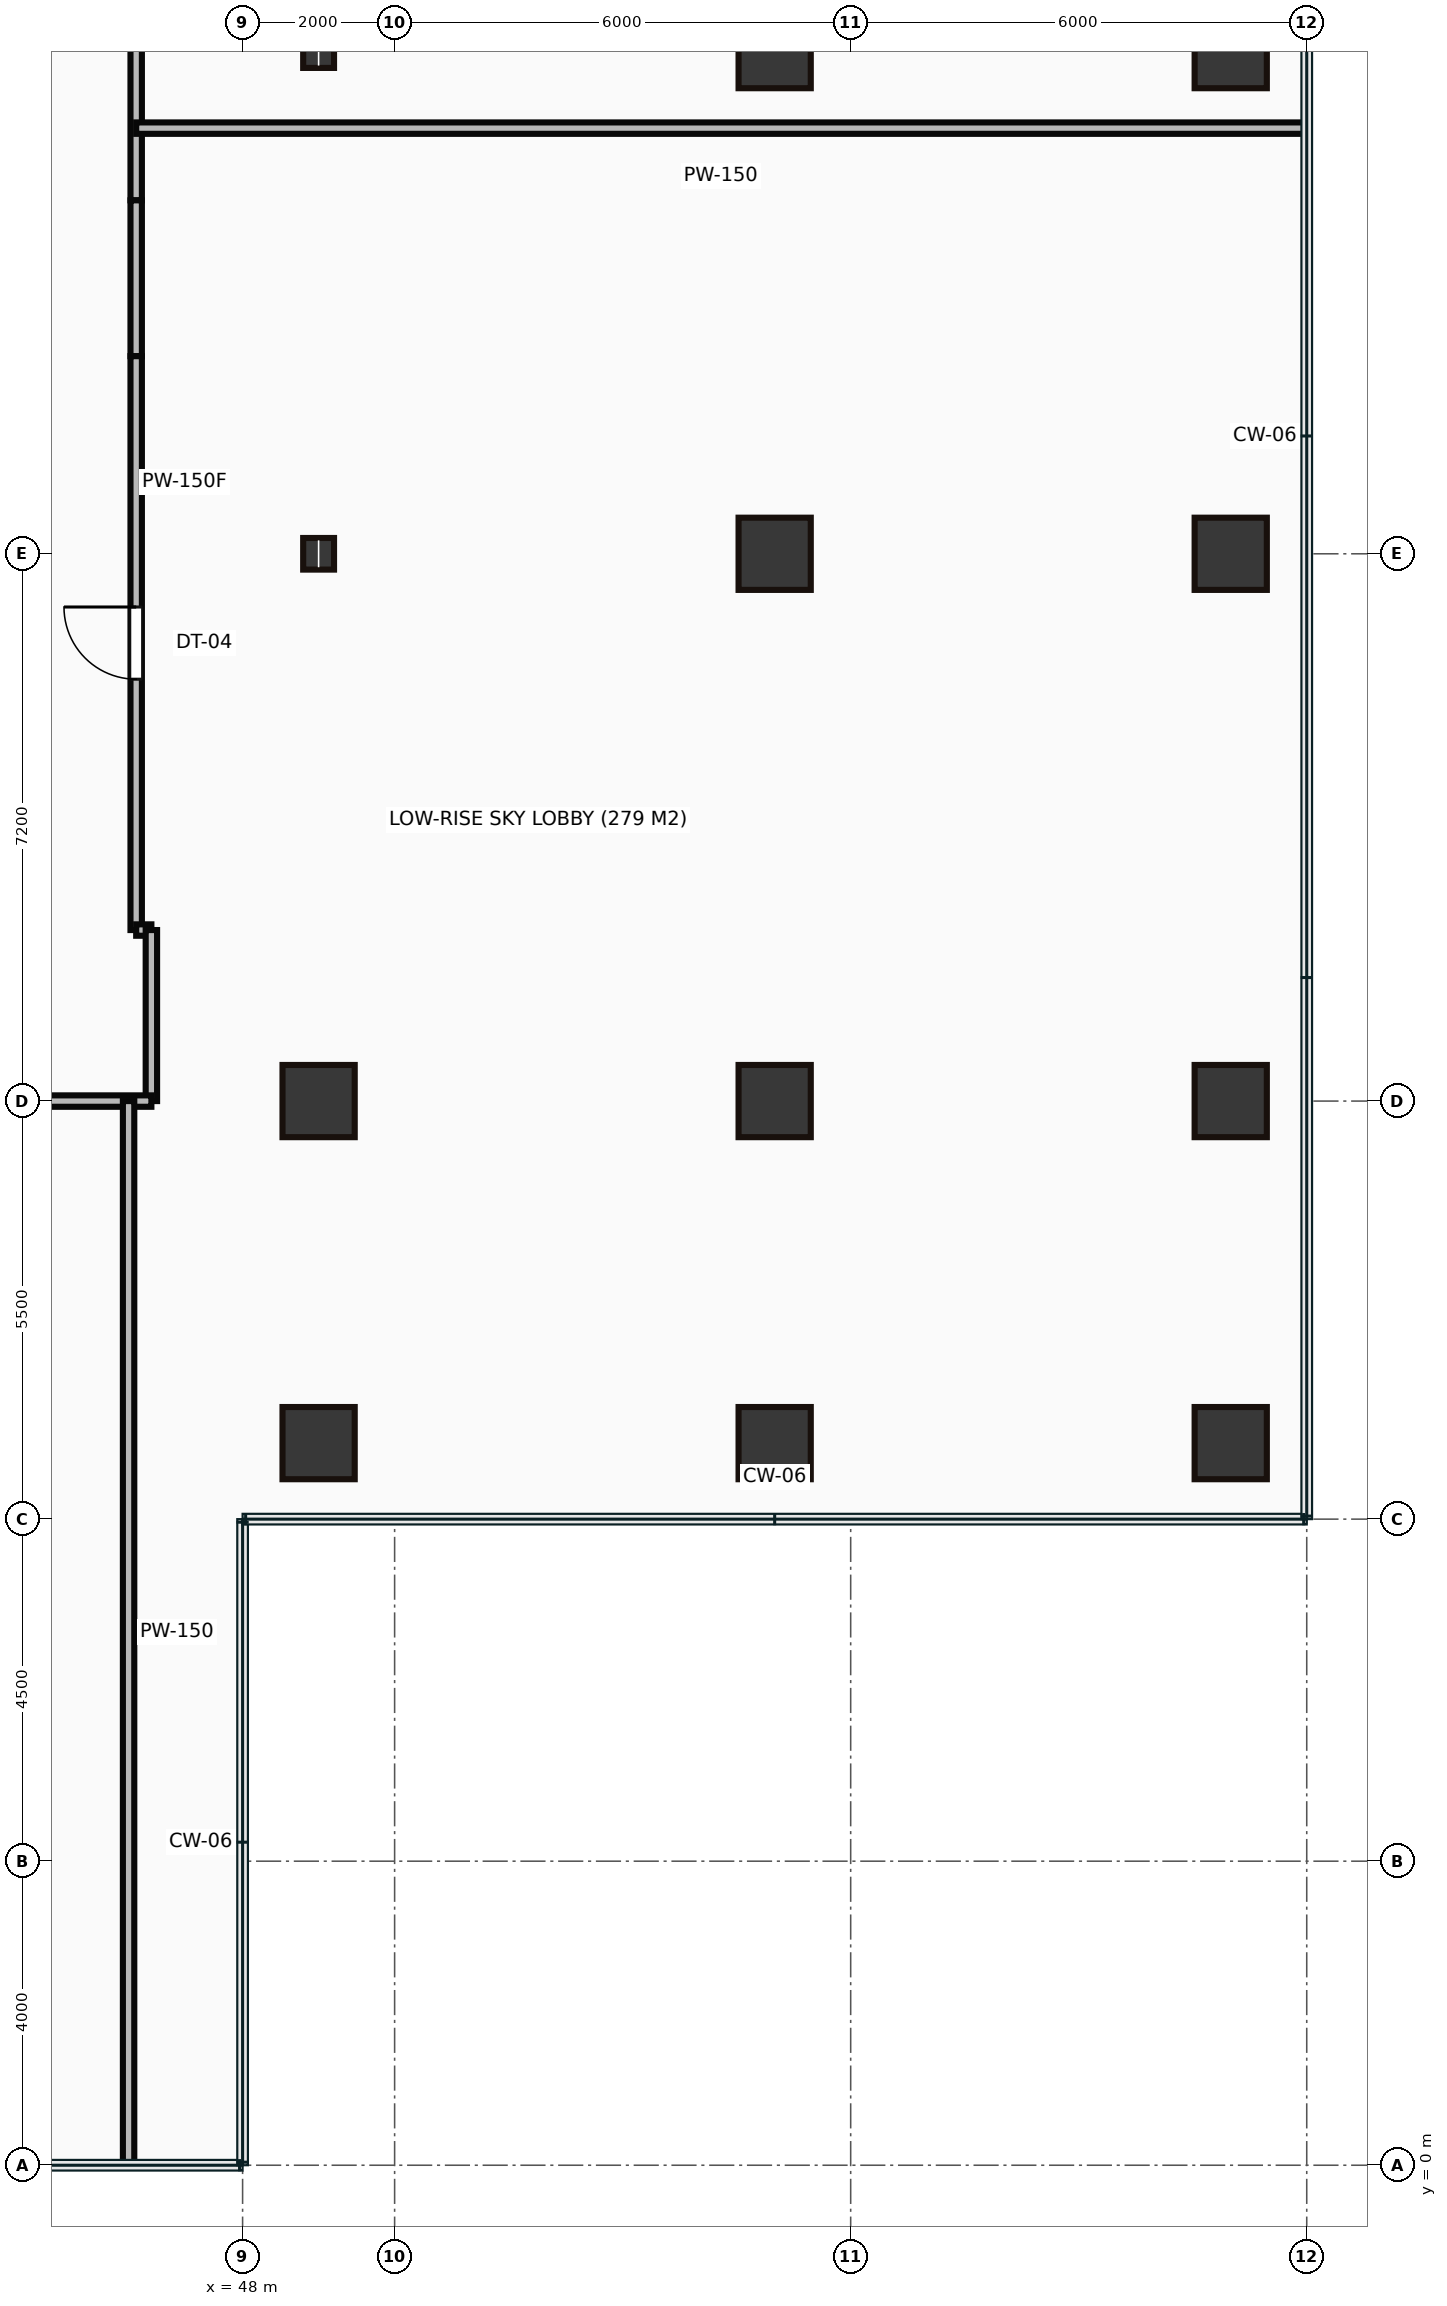
"""IFC4 building model, lengths in metres.
Left out: names, types, materials, properties, quantities, classifications, styles, units other than length and angle.
Written with IfcOpenShell. Run it as: python <this file> out.ifc"""

import sys

from ifc_helpers import new_model, si_unit, direction, frame, frame_2d, origin, origin_2d, place, context, subcontext, project, spatial, rectangle, hollow_rectangle, i_section, extrude, source, transform, mapped, element, fill, save


model = new_model("IFC4")
c1 = context("Model", 3, precision=1e-05, world=origin(), true_north=direction((0.0, 1.0)))
c2 = subcontext(c1, "Body", "Model", "MODEL_VIEW")
j1 = project(units=[si_unit("LENGTHUNIT", "METRE"), si_unit("PLANEANGLEUNIT", "RADIAN")], contexts=[c1])
p1 = place(None, origin())
s1 = spatial("IfcSite", under=j1, at=p1, CompositionType="ELEMENT")
p2 = place(p1, origin())
s2 = spatial("IfcBuilding", under=s1, at=p2, CompositionType="ELEMENT")
p3 = place(p2, frame((0.0, 0.0, 79.95)))
s3 = spatial("IfcBuildingStorey", under=s2, at=p3, CompositionType="ELEMENT", Elevation=79.95)
m1 = source(origin(), c2, "Body", "SweptSolid", [
    extrude(hollow_rectangle(XDim=0.95, YDim=0.95, WallThickness=0.045, at=origin_2d()), origin(), (0.0, 0.0, 1.0), 4.2),
])
for number, where, z_axis, x_axis in (
    (1, (49.0, 9.5, 0.0), (0.0, 0.0, 1.0), (1.0, 0.0, 0.0)),
    (2, (49.0, 14.0, 0.0), (0.0, 0.0, 1.0), (1.0, 0.0, 0.0)),
):
    element("IfcColumn", number, at=place(p3, frame(where, z_axis=z_axis, x_axis=x_axis)), inside=s3, PredefinedType="COLUMN", context=c2, shape_type="MappedRepresentation", body=[
        mapped(m1, transform((0.0, 0.0, 0.0))),
    ])
m2 = source(origin(), c2, "Body", "SweptSolid", [
    extrude(i_section(OverallWidth=0.406, OverallDepth=0.416, WebThickness=0.03, FlangeThickness=0.048, at=origin_2d()), origin(), (0.0, 0.0, 1.0), 4.2),
])
for number, where, z_axis, x_axis in (
    (3, (49.0, 21.2, 0.0), (0.0, 0.0, 1.0), (1.0, 0.0, 0.0)),
    (4, (49.0, 27.8, 0.0), (0.0, 0.0, 1.0), (1.0, 0.0, 0.0)),
):
    element("IfcColumn", number, at=place(p3, frame(where, z_axis=z_axis, x_axis=x_axis)), inside=s3, PredefinedType="COLUMN", context=c2, shape_type="MappedRepresentation", body=[
        mapped(m2, transform((0.0, 0.0, 0.0))),
    ])
for number, where, z_axis, x_axis in (
    (5, (55.0, 9.5, 0.0), (0.0, 0.0, 1.0), (1.0, 0.0, 0.0)),
    (6, (55.0, 14.0, 0.0), (0.0, 0.0, 1.0), (1.0, 0.0, 0.0)),
    (7, (55.0, 21.2, 0.0), (0.0, 0.0, 1.0), (1.0, 0.0, 0.0)),
    (8, (55.0, 27.8, 0.0), (0.0, 0.0, 1.0), (1.0, 0.0, 0.0)),
    (9, (61.0, 9.5, 0.0), (0.0, 0.0, 1.0), (1.0, 0.0, 0.0)),
    (10, (61.0, 14.0, 0.0), (0.0, 0.0, 1.0), (1.0, 0.0, 0.0)),
    (11, (61.0, 21.2, 0.0), (0.0, 0.0, 1.0), (1.0, 0.0, 0.0)),
    (12, (61.0, 27.8, 0.0), (0.0, 0.0, 1.0), (1.0, 0.0, 0.0)),
):
    element("IfcColumn", number, at=place(p3, frame(where, z_axis=z_axis, x_axis=x_axis)), inside=s3, PredefinedType="COLUMN", context=c2, shape_type="MappedRepresentation", body=[
        mapped(m1, transform((0.0, 0.0, 0.0))),
    ])
m3 = source(origin(), c2, "Body", "SweptSolid", [
    extrude(rectangle(XDim=9.15, YDim=0.15, at=frame_2d((4.575, 0.0))), origin(), (0.0, 0.0, 1.0), 3.9),
])
p4 = place(p3, frame((46.6, 35.0, 0.0), z_axis=(0.0, 0.0, 1.0), x_axis=(0.0, -1.0, 0.0)))
e13 = element("IfcWall", 13, at=p4, inside=s3, PredefinedType="PARTITIONING", context=c2, shape_type="MappedRepresentation", body=[
    mapped(m3, transform((0.0, 0.0, 0.0))),
])
p5 = place(p4, frame((3.755, 0.0, 0.0)))
e14 = element("IfcOpeningElement", 14, at=p5, cuts=e13, PredefinedType="OPENING", context=c2, shape_type="SweptSolid", body=[
    extrude(rectangle(XDim=0.95, YDim=2.15, at=frame_2d((0.475, 1.075))), frame((0.0, 0.085, 0.0), z_axis=(0.0, -1.0, 0.0), x_axis=(1.0, 0.0, 0.0)), (0.0, 0.0, 1.0), 0.17),
])
m4 = source(origin(), c2, "Body", "SweptSolid", [
    extrude(rectangle(XDim=2.05, YDim=0.15, at=frame_2d((1.025, 0.0))), origin(), (0.0, 0.0, 1.0), 3.9),
])
p6 = place(p3, frame((46.6, 25.85, 0.0), z_axis=(0.0, 0.0, 1.0), x_axis=(0.0, -1.0, 0.0)))
e15 = element("IfcWall", 15, at=p6, inside=s3, PredefinedType="PARTITIONING", context=c2, shape_type="MappedRepresentation", body=[
    mapped(m4, transform((0.0, 0.0, 0.0))),
])
m5 = source(origin(), c2, "Body", "SweptSolid", [
    extrude(rectangle(XDim=7.55, YDim=0.15, at=frame_2d((3.775, 0.0))), origin(), (0.0, 0.0, 1.0), 3.9),
])
p7 = place(p3, frame((46.6, 23.8, 0.0), z_axis=(0.0, 0.0, 1.0), x_axis=(0.0, -1.0, 0.0)))
e16 = element("IfcWall", 16, at=p7, inside=s3, PredefinedType="PARTITIONING", context=c2, shape_type="MappedRepresentation", body=[
    mapped(m5, transform((0.0, 0.0, 0.0))),
])
p8 = place(p7, frame((3.3, 0.0, 0.0)))
e17 = element("IfcOpeningElement", 17, at=p8, cuts=e16, PredefinedType="OPENING", context=c2, shape_type="SweptSolid", body=[
    extrude(rectangle(XDim=0.95, YDim=2.15, at=frame_2d((0.475, 1.075))), frame((0.0, 0.085, 0.0), z_axis=(0.0, -1.0, 0.0), x_axis=(1.0, 0.0, 0.0)), (0.0, 0.0, 1.0), 0.17),
])
m6 = source(origin(), c2, "Body", "SweptSolid", [
    extrude(rectangle(XDim=0.2, YDim=0.15, at=frame_2d((0.1, 0.0))), origin(), (0.0, 0.0, 1.0), 3.9),
])
p9 = place(p3, frame((46.6, 16.25, 0.0), z_axis=(0.0, 0.0, 1.0), x_axis=(1.0, 0.0, 0.0)))
e18 = element("IfcWall", 18, at=p9, inside=s3, PredefinedType="PARTITIONING", context=c2, shape_type="MappedRepresentation", body=[
    mapped(m6, transform((0.0, 0.0, 0.0))),
])
m7 = source(origin(), c2, "Body", "SweptSolid", [
    extrude(rectangle(XDim=2.25, YDim=0.15, at=frame_2d((1.125, 0.0))), origin(), (0.0, 0.0, 1.0), 3.9),
])
p10 = place(p3, frame((46.8, 16.25, 0.0), z_axis=(0.0, 0.0, 1.0), x_axis=(0.0, -1.0, 0.0)))
e19 = element("IfcWall", 19, at=p10, inside=s3, PredefinedType="PARTITIONING", context=c2, shape_type="MappedRepresentation", body=[
    mapped(m7, transform((0.0, 0.0, 0.0))),
])
m8 = source(origin(), c2, "Body", "SweptSolid", [
    extrude(rectangle(XDim=7.75, YDim=0.15, at=frame_2d((3.875, 0.0))), origin(), (0.0, 0.0, 1.0), 3.125),
])
p11 = place(p3, frame((46.8, 14.0, 0.0), z_axis=(0.0, 0.0, 1.0), x_axis=(-1.0, 0.0, 0.0)))
e20 = element("IfcWall", 20, at=p11, inside=s3, PredefinedType="PARTITIONING", context=c2, shape_type="MappedRepresentation", body=[
    mapped(m8, transform((0.0, 0.0, 0.0))),
])
p12 = place(p11, frame((2.254, 0.0, 0.0)))
e21 = element("IfcOpeningElement", 21, at=p12, cuts=e20, PredefinedType="OPENING", context=c2, shape_type="SweptSolid", body=[
    extrude(rectangle(XDim=0.95, YDim=2.15, at=frame_2d((0.475, 1.075))), frame((0.0, 0.085, 0.0), z_axis=(0.0, -1.0, 0.0), x_axis=(1.0, 0.0, 0.0)), (0.0, 0.0, 1.0), 0.17),
])
m9 = source(origin(), c2, "Body", "SweptSolid", [
    extrude(rectangle(XDim=13.98, YDim=0.15, at=frame_2d((6.99, 0.0))), origin(), (0.0, 0.0, 1.0), 3.9),
])
p13 = place(p3, frame((46.5, 14.0, 0.0), z_axis=(0.0, 0.0, 1.0), x_axis=(0.0, -1.0, 0.0)))
e22 = element("IfcWall", 22, at=p13, inside=s3, PredefinedType="PARTITIONING", context=c2, shape_type="MappedRepresentation", body=[
    mapped(m9, transform((0.0, 0.0, 0.0))),
])
m10 = source(origin(), c2, "Body", "SweptSolid", [
    extrude(rectangle(XDim=15.38, YDim=0.15, at=frame_2d((7.69, 0.0))), origin(), (0.0, 0.0, 1.0), 3.9),
])
p14 = place(p3, frame((61.98, 26.8, 0.0), z_axis=(0.0, 0.0, 1.0), x_axis=(-1.0, 0.0, 0.0)))
e23 = element("IfcWall", 23, at=p14, inside=s3, PredefinedType="PARTITIONING", context=c2, shape_type="MappedRepresentation", body=[
    mapped(m10, transform((0.0, 0.0, 0.0))),
])
m11 = source(origin(), c2, "Body", "SweptSolid", [
    extrude(rectangle(XDim=0.95, YDim=2.15, at=frame_2d((0.475, 1.075))), frame((0.0, 0.025, 0.0), z_axis=(0.0, -1.0, 0.0), x_axis=(1.0, 0.0, 0.0)), (0.0, 0.0, 1.0), 0.05),
])
p15 = place(p8, origin())
e24 = element("IfcDoor", 24, at=p15, inside=s3, OperationType="SINGLE_SWING_LEFT", PredefinedType="DOOR", context=c2, shape_type="MappedRepresentation", body=[
    mapped(m11, transform((0.0, 0.0, 0.0))),
])
fill(e17, e24)
save(model, sys.argv[1])
